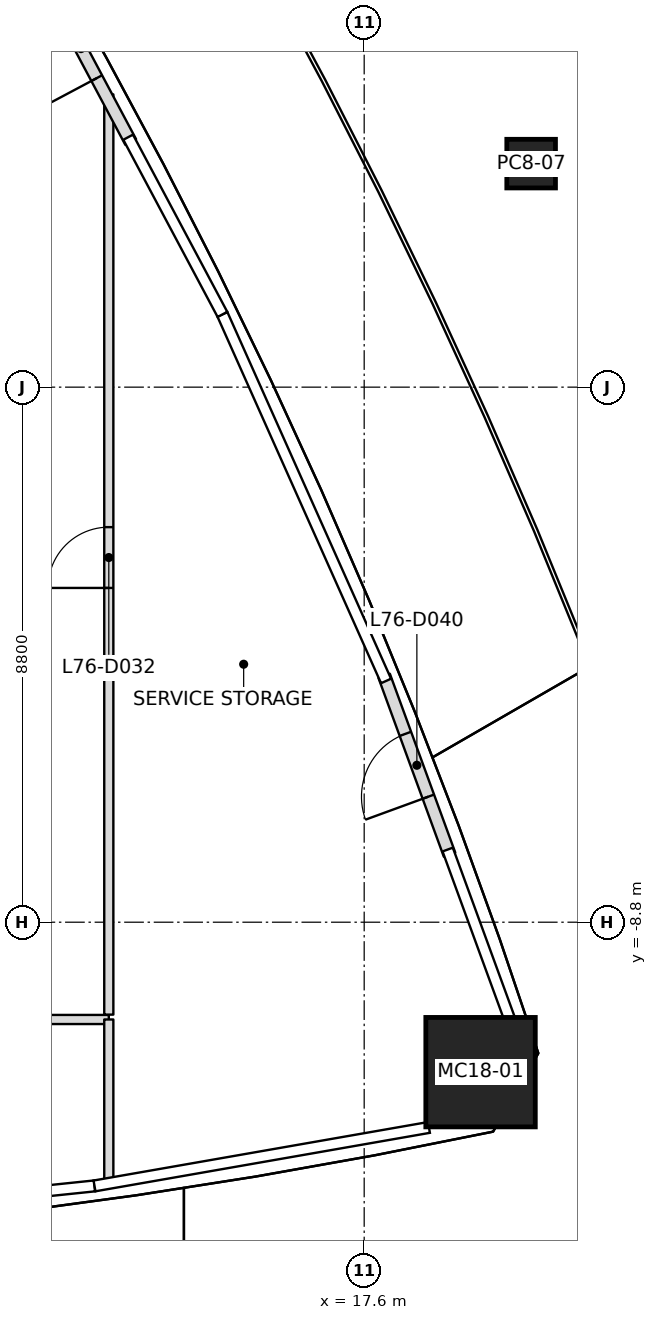
"""IFC4 building model, lengths in metres.
Left out: names, types, materials, properties, quantities, classifications, styles, units other than length and angle.
Written with IfcOpenShell. Run it as: python <this file> out.ifc"""

import sys

from ifc_helpers import new_model, si_unit, direction, frame, frame_2d, origin, origin_2d, place, context, subcontext, project, spatial, rectangle, extrude, clip, halfspace, element, fill, save


model = new_model("IFC4")
c1 = context("Model", 3, precision=1e-05, world=origin(), true_north=direction((0.0, 1.0)))
c2 = subcontext(c1, "Body", "Model", "MODEL_VIEW")
j1 = project(units=[si_unit("LENGTHUNIT", "METRE"), si_unit("PLANEANGLEUNIT", "RADIAN")], contexts=[c1])
p1 = place(None, origin())
s1 = spatial("IfcSite", under=j1, at=p1, CompositionType="ELEMENT")
p2 = place(p1, origin())
s2 = spatial("IfcBuilding", under=s1, at=p2, CompositionType="ELEMENT")
p3 = place(p2, frame((0.0, 0.0, 339.4)))
s3 = spatial("IfcBuildingStorey", under=s2, at=p3, CompositionType="ELEMENT", Elevation=339.4)
p4 = place(p3, frame((19.514, -11.266, 0.0), z_axis=(0.0, 0.0, 1.0), x_axis=(1.0, 0.0, 0.0)))
e1 = element("IfcColumn", 1, at=p4, inside=s3, PredefinedType="COLUMN", context=c2, shape_type="SweptSolid", body=[
    clip(extrude(rectangle(XDim=1.8, YDim=1.8, at=origin_2d()), origin(), (0.0, 0.0, 1.0), 5.4), halfspace(frame((0.0, 0.0, 0.009)), True)),
])
p5 = place(p3, frame((20.346, 3.676, 0.0), z_axis=(0.0, 0.0, 1.0), x_axis=(-0.438895015251, 0.898538349537, 0.0)))
e2 = element("IfcColumn", 2, at=p5, inside=s3, PredefinedType="COLUMN", context=c2, shape_type="SweptSolid", body=[
    clip(extrude(rectangle(XDim=0.8, YDim=0.8, at=origin_2d()), origin(), (0.0, 0.0, 1.0), 5.4), halfspace(frame((0.0, 0.0, 0.002)), True)),
])
p6 = place(p3, frame((19.004, -7.69, 0.0), z_axis=(0.0, 0.0, 1.0), x_axis=(-0.343363544049, 0.939202574857, 0.0)))
e3 = element("IfcWall", 3, at=p6, inside=s3, PredefinedType="SOLIDWALL", context=c2, shape_type="SweptSolid", body=[
    extrude(rectangle(XDim=3.132, YDim=0.2, at=frame_2d((1.566, 0.0))), origin(), (0.0, 0.0, 1.0), 4.64),
])
p7 = place(p6, frame((1.016, 0.0, 0.0)))
e4 = element("IfcOpeningElement", 4, at=p7, cuts=e3, PredefinedType="OPENING", context=c2, shape_type="SweptSolid", body=[
    extrude(rectangle(XDim=1.1, YDim=2.1, at=frame_2d((0.55, 1.05))), frame((0.0, 0.1, 0.0), z_axis=(0.0, -1.0, 0.0), x_axis=(1.0, 0.0, 0.0)), (0.0, 0.0, 1.0), 0.2),
])
p8 = place(p3, frame((13.76, 4.031, 0.0), z_axis=(0.0, 0.0, 1.0), x_axis=(-0.469681595123, 0.882835884637, 0.0)))
e5 = element("IfcWall", 5, at=p8, inside=s3, PredefinedType="SOLIDWALL", context=c2, shape_type="SweptSolid", body=[
    extrude(rectangle(XDim=3.481, YDim=0.2, at=frame_2d((1.741, 0.0))), origin(), (0.0, 0.0, 1.0), 4.533),
])
p9 = place(p8, frame((1.19, 0.0, 0.0)))
e6 = element("IfcOpeningElement", 6, at=p9, cuts=e5, PredefinedType="OPENING", context=c2, shape_type="SweptSolid", body=[
    extrude(rectangle(XDim=1.1, YDim=2.1, at=frame_2d((0.55, 1.05))), frame((0.0, 0.1, 0.0), z_axis=(0.0, -1.0, 0.0), x_axis=(1.0, 0.0, 0.0)), (0.0, 0.0, 1.0), 0.2),
])
p10 = place(p3, frame((13.4, -13.101, 0.0), z_axis=(0.0, 0.0, 1.0), x_axis=(0.0, 1.0, 0.0)))
e7 = element("IfcWall", 7, at=p10, inside=s3, PredefinedType="PARTITIONING", context=c2, shape_type="SweptSolid", body=[
    extrude(rectangle(XDim=2.701, YDim=0.15, at=frame_2d((1.35, 0.0))), origin(), (0.0, 0.0, 1.0), 4.75),
])
p11 = place(p3, frame((-13.32, -10.4, 0.0), z_axis=(0.0, 0.0, 1.0), x_axis=(1.0, 0.0, 0.0)))
e8 = element("IfcWall", 8, at=p11, inside=s3, PredefinedType="PARTITIONING", context=c2, shape_type="SweptSolid", body=[
    extrude(rectangle(XDim=26.72, YDim=0.15, at=frame_2d((13.36, 0.0))), origin(), (0.0, 0.0, 1.0), 4.533),
])
p12 = place(p11, frame((4.32, 0.0, 0.0)))
e9 = element("IfcOpeningElement", 9, at=p12, cuts=e8, PredefinedType="OPENING", context=c2, shape_type="SweptSolid", body=[
    extrude(rectangle(XDim=1.0, YDim=2.1, at=frame_2d((0.5, 1.05))), frame((0.0, 0.075, 0.0), z_axis=(0.0, -1.0, 0.0), x_axis=(1.0, 0.0, 0.0)), (0.0, 0.0, 1.0), 0.15),
])
p13 = place(p11, frame((13.22, 0.0, 0.0)))
e10 = element("IfcOpeningElement", 10, at=p13, cuts=e8, PredefinedType="OPENING", context=c2, shape_type="SweptSolid", body=[
    extrude(rectangle(XDim=1.0, YDim=2.1, at=frame_2d((0.5, 1.05))), frame((0.0, 0.075, 0.0), z_axis=(0.0, -1.0, 0.0), x_axis=(1.0, 0.0, 0.0)), (0.0, 0.0, 1.0), 0.15),
])
p14 = place(p11, frame((21.72, 0.0, 0.0)))
e11 = element("IfcOpeningElement", 11, at=p14, cuts=e8, PredefinedType="OPENING", context=c2, shape_type="SweptSolid", body=[
    extrude(rectangle(XDim=1.0, YDim=2.1, at=frame_2d((0.5, 1.05))), frame((0.0, 0.075, 0.0), z_axis=(0.0, -1.0, 0.0), x_axis=(1.0, 0.0, 0.0)), (0.0, 0.0, 1.0), 0.15),
])
p15 = place(p3, frame((13.4, -10.32, 0.0), z_axis=(0.0, 0.0, 1.0), x_axis=(0.0, 1.0, 0.0)))
e12 = element("IfcWall", 12, at=p15, inside=s3, PredefinedType="PARTITIONING", context=c2, shape_type="SweptSolid", body=[
    extrude(rectangle(XDim=15.135, YDim=0.15, at=frame_2d((7.568, 0.0))), origin(), (0.0, 0.0, 1.0), 4.533),
])
p16 = place(p15, frame((7.018, 0.0, 0.0)))
e13 = element("IfcOpeningElement", 13, at=p16, cuts=e12, PredefinedType="OPENING", context=c2, shape_type="SweptSolid", body=[
    extrude(rectangle(XDim=1.0, YDim=2.1, at=frame_2d((0.5, 1.05))), frame((0.0, 0.075, 0.0), z_axis=(0.0, -1.0, 0.0), x_axis=(1.0, 0.0, 0.0)), (0.0, 0.0, 1.0), 0.15),
])
p17 = place(p7, origin())
e14 = element("IfcDoor", 14, at=p17, inside=s3, OperationType="SINGLE_SWING_LEFT", PredefinedType="DOOR", context=c2, shape_type="SweptSolid", body=[
    extrude(rectangle(XDim=1.1, YDim=2.1, at=frame_2d((0.55, 1.05))), frame((0.0, 0.025, 0.0), z_axis=(0.0, -1.0, 0.0), x_axis=(1.0, 0.0, 0.0)), (0.0, 0.0, 1.0), 0.05),
])
fill(e4, e14)
p18 = place(p9, origin())
e15 = element("IfcDoor", 15, at=p18, inside=s3, OperationType="SINGLE_SWING_RIGHT", PredefinedType="DOOR", context=c2, shape_type="SweptSolid", body=[
    extrude(rectangle(XDim=1.1, YDim=2.1, at=frame_2d((0.55, 1.05))), frame((0.0, 0.025, 0.0), z_axis=(0.0, -1.0, 0.0), x_axis=(1.0, 0.0, 0.0)), (0.0, 0.0, 1.0), 0.05),
])
fill(e6, e15)
p19 = place(p16, origin())
e16 = element("IfcDoor", 16, at=p19, inside=s3, OperationType="SINGLE_SWING_LEFT", PredefinedType="DOOR", context=c2, shape_type="SweptSolid", body=[
    extrude(rectangle(XDim=1.0, YDim=2.1, at=frame_2d((0.5, 1.05))), frame((0.0, 0.025, 0.0), z_axis=(0.0, -1.0, 0.0), x_axis=(1.0, 0.0, 0.0)), (0.0, 0.0, 1.0), 0.05),
])
fill(e13, e16)
save(model, sys.argv[1])
